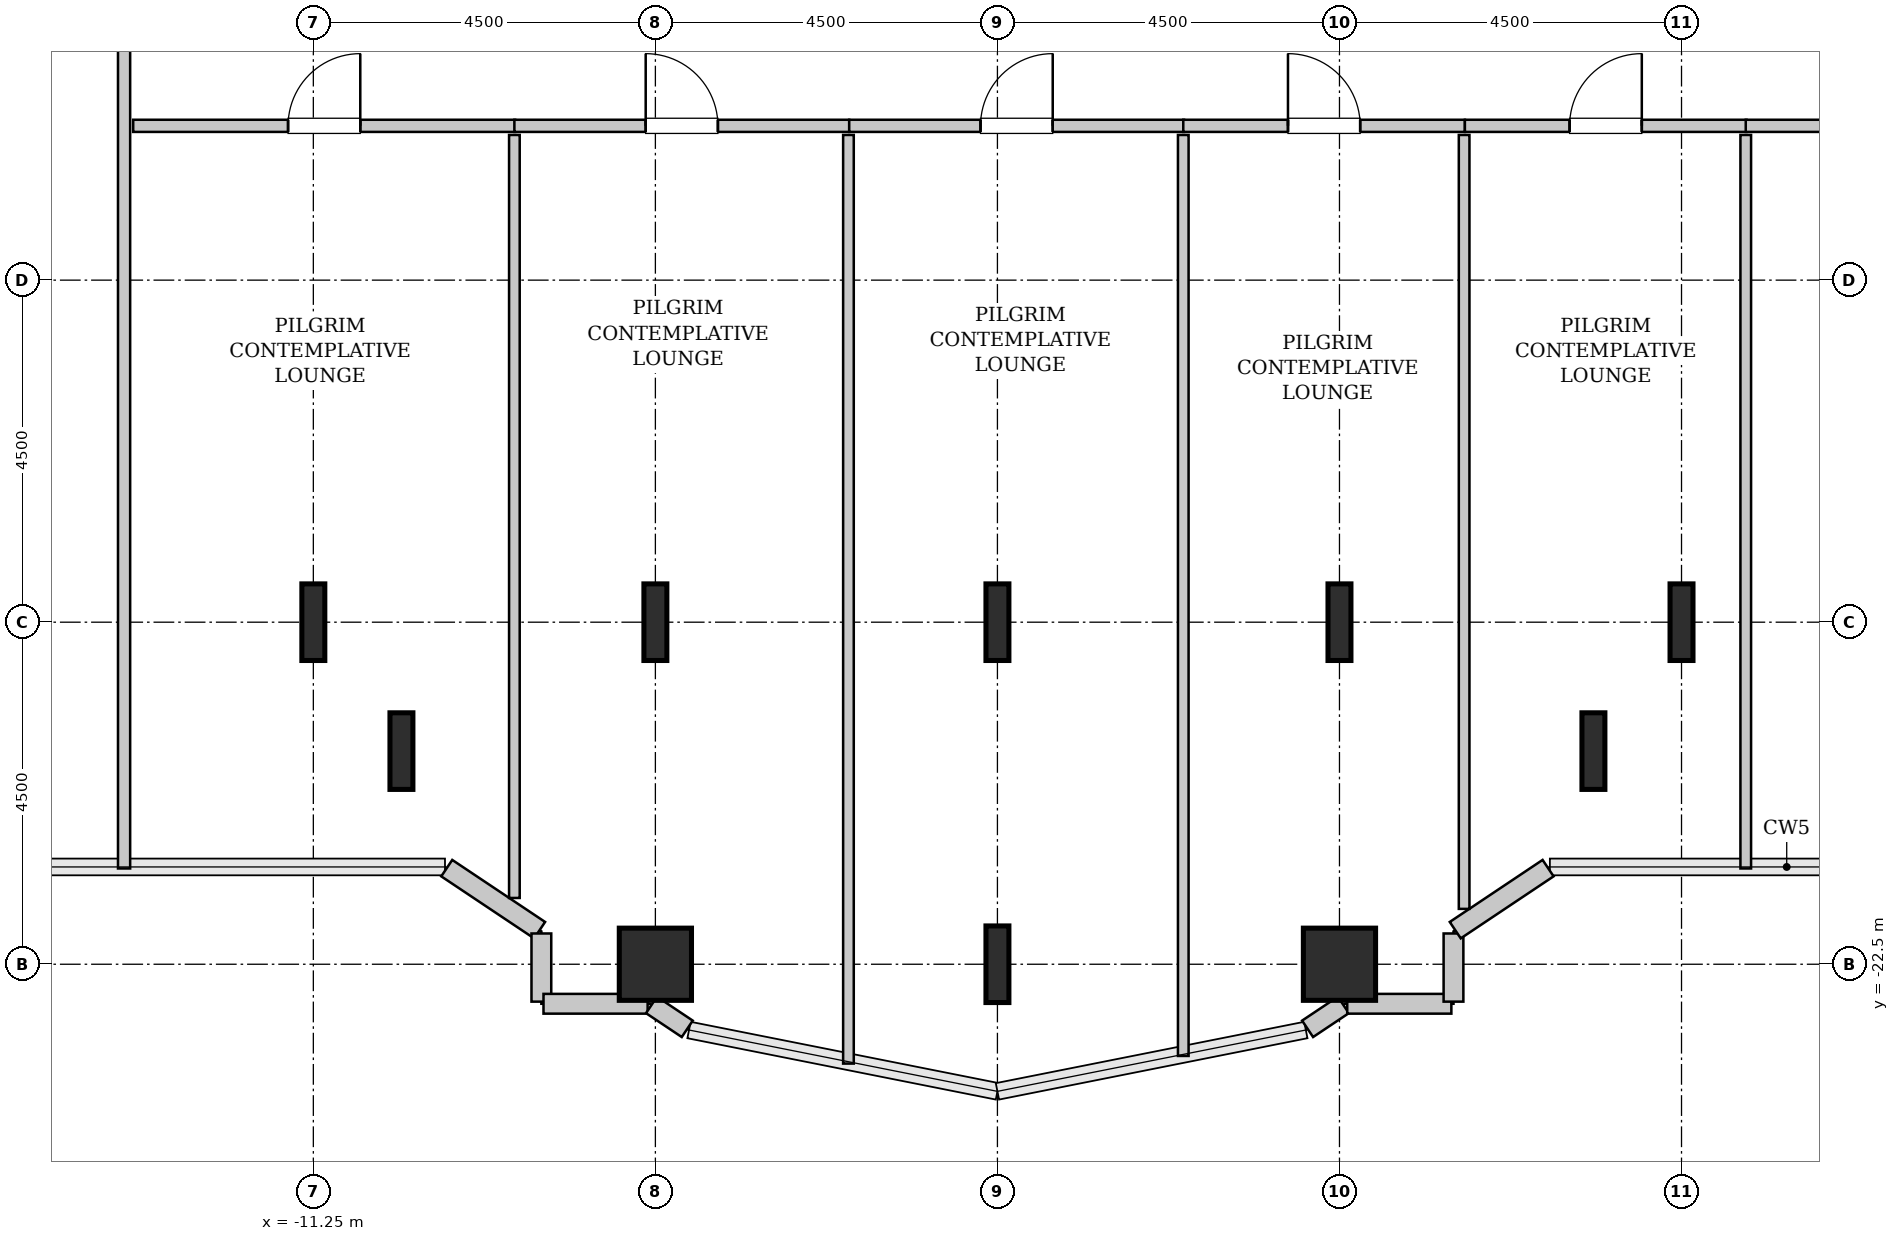
"""IFC4 building model, lengths in metres.
Left out: names, types, materials, properties, quantities, classifications, styles, units other than length and angle.
Written with IfcOpenShell. Run it as: python <this file> out.ifc"""

import sys

from ifc_helpers import new_model, si_unit, direction, frame, frame_2d, origin, origin_2d, place, context, subcontext, project, spatial, rectangle, hollow_rectangle, i_section, extrude, source, transform, mapped, element, fill, save


model = new_model("IFC4")
c1 = context("Model", 3, precision=1e-05, world=origin(), true_north=direction((0.0, 1.0)))
c2 = subcontext(c1, "Body", "Model", "MODEL_VIEW")
j1 = project(units=[si_unit("LENGTHUNIT", "METRE"), si_unit("PLANEANGLEUNIT", "RADIAN")], contexts=[c1])
p1 = place(None, origin())
s1 = spatial("IfcSite", under=j1, at=p1, CompositionType="ELEMENT")
p2 = place(p1, origin())
s2 = spatial("IfcBuilding", under=s1, at=p2, CompositionType="ELEMENT")
p3 = place(p2, frame((0.0, 0.0, 48.2)))
s3 = spatial("IfcBuildingStorey", under=s2, at=p3, CompositionType="ELEMENT", Elevation=48.2)
m1 = source(origin(), c2, "Body", "SweptSolid", [
    extrude(i_section(OverallWidth=0.302, OverallDepth=1.008, WebThickness=0.021, FlangeThickness=0.04, FilletRadius=0.03, at=origin_2d()), origin(), (0.0, 0.0, 1.0), 3.8),
])
for number, where, z_axis, x_axis in (
    (1, (-11.25, -18.0, 0.0), (0.0, 0.0, 1.0), (1.0, 0.0, 0.0)),
    (2, (-10.091, -19.696, 0.0), (0.0, 0.0, 1.0), (1.0, 0.0, 0.0)),
):
    element("IfcColumn", number, at=place(p3, frame(where, z_axis=z_axis, x_axis=x_axis)), inside=s3, PredefinedType="COLUMN", context=c2, shape_type="MappedRepresentation", body=[
        mapped(m1, transform((0.0, 0.0, 0.0), x_axis=(1.0, 0.0, 0.0), y_axis=(0.0, 1.0, 0.0), z_axis=(0.0, 0.0, 1.0), scale=1.0)),
    ])
m2 = source(origin(), c2, "Body", "SweptSolid", [
    extrude(hollow_rectangle(XDim=0.95, YDim=0.95, WallThickness=0.045, InnerFilletRadius=0.045, OuterFilletRadius=0.09, at=origin_2d()), origin(), (0.0, 0.0, 1.0), 3.8),
])
p4 = place(p3, frame((-6.75, -22.5, 0.0), z_axis=(0.0, 0.0, 1.0), x_axis=(1.0, 0.0, 0.0)))
e3 = element("IfcColumn", 3, at=p4, inside=s3, PredefinedType="COLUMN", context=c2, shape_type="MappedRepresentation", body=[
    mapped(m2, transform((0.0, 0.0, 0.0), x_axis=(1.0, 0.0, 0.0), y_axis=(0.0, 1.0, 0.0), z_axis=(0.0, 0.0, 1.0), scale=1.0)),
])
for number, where, z_axis, x_axis in (
    (4, (-6.75, -18.0, 0.0), (0.0, 0.0, 1.0), (1.0, 0.0, 0.0)),
    (5, (-2.25, -22.5, 0.0), (0.0, 0.0, 1.0), (1.0, 0.0, 0.0)),
    (6, (-2.25, -18.0, 0.0), (0.0, 0.0, 1.0), (1.0, 0.0, 0.0)),
):
    element("IfcColumn", number, at=place(p3, frame(where, z_axis=z_axis, x_axis=x_axis)), inside=s3, PredefinedType="COLUMN", context=c2, shape_type="MappedRepresentation", body=[
        mapped(m1, transform((0.0, 0.0, 0.0), x_axis=(1.0, 0.0, 0.0), y_axis=(0.0, 1.0, 0.0), z_axis=(0.0, 0.0, 1.0), scale=1.0)),
    ])
p5 = place(p3, frame((2.25, -22.5, 0.0), z_axis=(0.0, 0.0, 1.0), x_axis=(1.0, 0.0, 0.0)))
e7 = element("IfcColumn", 7, at=p5, inside=s3, PredefinedType="COLUMN", context=c2, shape_type="MappedRepresentation", body=[
    mapped(m2, transform((0.0, 0.0, 0.0), x_axis=(1.0, 0.0, 0.0), y_axis=(0.0, 1.0, 0.0), z_axis=(0.0, 0.0, 1.0), scale=1.0)),
])
for number, where, z_axis, x_axis in (
    (8, (2.25, -18.0, 0.0), (0.0, 0.0, 1.0), (1.0, 0.0, 0.0)),
    (9, (5.591, -19.696, 0.0), (0.0, 0.0, 1.0), (1.0, 0.0, 0.0)),
    (10, (6.75, -18.0, 0.0), (0.0, 0.0, 1.0), (1.0, 0.0, 0.0)),
):
    element("IfcColumn", number, at=place(p3, frame(where, z_axis=z_axis, x_axis=x_axis)), inside=s3, PredefinedType="COLUMN", context=c2, shape_type="MappedRepresentation", body=[
        mapped(m1, transform((0.0, 0.0, 0.0), x_axis=(1.0, 0.0, 0.0), y_axis=(0.0, 1.0, 0.0), z_axis=(0.0, 0.0, 1.0), scale=1.0)),
    ])
m3 = source(origin(), c2, "Body", "SweptSolid", [
    extrude(rectangle(XDim=1.469, YDim=0.26, at=frame_2d((0.734, 0.0))), origin(), (0.0, 0.0, 1.0), 3.55),
])
p6 = place(p3, frame((-9.495, -21.236, 0.0), z_axis=(0.0, 0.0, 1.0), x_axis=(0.831461760506, -0.555581983884, 0.0)))
e11 = element("IfcWall", 11, at=p6, inside=s3, PredefinedType="SOLIDWALL", context=c2, shape_type="MappedRepresentation", body=[
    mapped(m3, transform((0.0, 0.0, 0.0), x_axis=(1.0, 0.0, 0.0), y_axis=(0.0, 1.0, 0.0), z_axis=(0.0, 0.0, 1.0), scale=1.0)),
])
m4 = source(origin(), c2, "Body", "SweptSolid", [
    extrude(rectangle(XDim=0.897, YDim=0.26, at=frame_2d((0.448, 0.0))), origin(), (0.0, 0.0, 1.0), 3.55),
])
p7 = place(p3, frame((-8.25, -22.095, 0.0), z_axis=(0.0, 0.0, 1.0), x_axis=(0.0, -1.0, 0.0)))
e12 = element("IfcWall", 12, at=p7, inside=s3, PredefinedType="SOLIDWALL", context=c2, shape_type="MappedRepresentation", body=[
    mapped(m4, transform((0.0, 0.0, 0.0), x_axis=(1.0, 0.0, 0.0), y_axis=(0.0, 1.0, 0.0), z_axis=(0.0, 0.0, 1.0), scale=1.0)),
])
m5 = source(origin(), c2, "Body", "SweptSolid", [
    extrude(rectangle(XDim=1.37, YDim=0.26, at=frame_2d((0.685, 0.0))), origin(), (0.0, 0.0, 1.0), 3.55),
])
p8 = place(p3, frame((-8.222, -23.02, 0.0), z_axis=(0.0, 0.0, 1.0), x_axis=(1.0, 0.0, 0.0)))
e13 = element("IfcWall", 13, at=p8, inside=s3, PredefinedType="SOLIDWALL", context=c2, shape_type="MappedRepresentation", body=[
    mapped(m5, transform((0.0, 0.0, 0.0), x_axis=(1.0, 0.0, 0.0), y_axis=(0.0, 1.0, 0.0), z_axis=(0.0, 0.0, 1.0), scale=1.0)),
])
m6 = source(origin(), c2, "Body", "SweptSolid", [
    extrude(rectangle(XDim=0.565, YDim=0.26, at=frame_2d((0.283, 0.0))), origin(), (0.0, 0.0, 1.0), 3.55),
])
for number, where, z_axis, x_axis in (
    (14, (-6.801, -23.036, 0.0), (0.0, 0.0, 1.0), (0.832, -0.555, 0.0)),
    (15, (1.831, -23.35, 0.0), (0.0, 0.0, 1.0), (0.832, 0.555, 0.0)),
):
    element("IfcWall", number, at=place(p3, frame(where, z_axis=z_axis, x_axis=x_axis)), inside=s3, PredefinedType="SOLIDWALL", context=c2, shape_type="MappedRepresentation", body=[
        mapped(m6, transform((0.0, 0.0, 0.0), x_axis=(1.0, 0.0, 0.0), y_axis=(0.0, 1.0, 0.0), z_axis=(0.0, 0.0, 1.0), scale=1.0)),
    ])
p9 = place(p3, frame((2.352, -23.02, 0.0), z_axis=(0.0, 0.0, 1.0), x_axis=(1.0, 0.0, 0.0)))
e16 = element("IfcWall", 16, at=p9, inside=s3, PredefinedType="SOLIDWALL", context=c2, shape_type="MappedRepresentation", body=[
    mapped(m5, transform((0.0, 0.0, 0.0), x_axis=(1.0, 0.0, 0.0), y_axis=(0.0, 1.0, 0.0), z_axis=(0.0, 0.0, 1.0), scale=1.0)),
])
p10 = place(p3, frame((3.75, -22.992, 0.0), z_axis=(0.0, 0.0, 1.0), x_axis=(0.0, 1.0, 0.0)))
e17 = element("IfcWall", 17, at=p10, inside=s3, PredefinedType="SOLIDWALL", context=c2, shape_type="MappedRepresentation", body=[
    mapped(m4, transform((0.0, 0.0, 0.0), x_axis=(1.0, 0.0, 0.0), y_axis=(0.0, 1.0, 0.0), z_axis=(0.0, 0.0, 1.0), scale=1.0)),
])
p11 = place(p3, frame((3.773, -22.052, 0.0), z_axis=(0.0, 0.0, 1.0), x_axis=(0.831461760506, 0.555581983884, 0.0)))
e18 = element("IfcWall", 18, at=p11, inside=s3, PredefinedType="SOLIDWALL", context=c2, shape_type="MappedRepresentation", body=[
    mapped(m3, transform((0.0, 0.0, 0.0), x_axis=(1.0, 0.0, 0.0), y_axis=(0.0, 1.0, 0.0), z_axis=(0.0, 0.0, 1.0), scale=1.0)),
])
m7 = source(origin(), c2, "Body", "SweptSolid", [
    extrude(rectangle(XDim=12.745, YDim=0.16, at=frame_2d((6.373, 0.0))), origin(), (0.0, 0.0, 1.0), 3.535),
])
p12 = place(p3, frame((-13.74, -21.24, 0.0), z_axis=(0.0, 0.0, 1.0), x_axis=(0.0, 1.0, 0.0)))
e19 = element("IfcWall", 19, at=p12, inside=s3, PredefinedType="PARTITIONING", context=c2, shape_type="MappedRepresentation", body=[
    mapped(m7, transform((0.0, 0.0, 0.0), x_axis=(1.0, 0.0, 0.0), y_axis=(0.0, 1.0, 0.0), z_axis=(0.0, 0.0, 1.0), scale=1.0)),
])
p13 = place(p12, frame((10.762, 0.0, 0.0)))
e20 = element("IfcOpeningElement", 20, at=p13, cuts=e19, PredefinedType="OPENING", context=c2, shape_type="SweptSolid", body=[
    extrude(rectangle(XDim=0.95, YDim=2.1, at=frame_2d((0.475, 1.05))), frame((0.0, 0.09, 0.0), z_axis=(0.0, -1.0, 0.0), x_axis=(1.0, 0.0, 0.0)), (0.0, 0.0, 1.0), 0.18),
])
m8 = source(origin(), c2, "Body", "SweptSolid", [
    extrude(rectangle(XDim=5.025, YDim=0.16, at=frame_2d((2.513, 0.0))), origin(), (0.0, 0.0, 1.0), 3.535),
])
p14 = place(p3, frame((-13.62, -11.47, 0.0), z_axis=(0.0, 0.0, 1.0), x_axis=(1.0, 0.0, 0.0)))
e21 = element("IfcWall", 21, at=p14, inside=s3, PredefinedType="PARTITIONING", context=c2, shape_type="MappedRepresentation", body=[
    mapped(m8, transform((0.0, 0.0, 0.0), x_axis=(1.0, 0.0, 0.0), y_axis=(0.0, 1.0, 0.0), z_axis=(0.0, 0.0, 1.0), scale=1.0)),
])
p15 = place(p14, frame((2.038, 0.0, 0.0)))
e22 = element("IfcOpeningElement", 22, at=p15, cuts=e21, PredefinedType="OPENING", context=c2, shape_type="SweptSolid", body=[
    extrude(rectangle(XDim=0.95, YDim=2.1, at=frame_2d((0.475, 1.05))), frame((0.0, 0.09, 0.0), z_axis=(0.0, -1.0, 0.0), x_axis=(1.0, 0.0, 0.0)), (0.0, 0.0, 1.0), 0.18),
])
m9 = source(origin(), c2, "Body", "SweptSolid", [
    extrude(rectangle(XDim=10.038, YDim=0.14, at=frame_2d((5.019, 0.0))), origin(), (0.0, 0.0, 1.0), 3.535),
])
p16 = place(p3, frame((-8.605, -21.628, 0.0), z_axis=(0.0, 0.0, 1.0), x_axis=(0.0, 1.0, 0.0)))
e23 = element("IfcWall", 23, at=p16, inside=s3, PredefinedType="PARTITIONING", context=c2, shape_type="MappedRepresentation", body=[
    mapped(m9, transform((0.0, 0.0, 0.0), x_axis=(1.0, 0.0, 0.0), y_axis=(0.0, 1.0, 0.0), z_axis=(0.0, 0.0, 1.0), scale=1.0)),
])
m10 = source(origin(), c2, "Body", "SweptSolid", [
    extrude(rectangle(XDim=4.405, YDim=0.16, at=frame_2d((2.203, 0.0))), origin(), (0.0, 0.0, 1.0), 3.535),
])
p17 = place(p3, frame((-8.605, -11.47, 0.0), z_axis=(0.0, 0.0, 1.0), x_axis=(1.0, 0.0, 0.0)))
e24 = element("IfcWall", 24, at=p17, inside=s3, PredefinedType="PARTITIONING", context=c2, shape_type="MappedRepresentation", body=[
    mapped(m10, transform((0.0, 0.0, 0.0), x_axis=(1.0, 0.0, 0.0), y_axis=(0.0, 1.0, 0.0), z_axis=(0.0, 0.0, 1.0), scale=1.0)),
])
p18 = place(p17, frame((1.728, 0.0, 0.0)))
e25 = element("IfcOpeningElement", 25, at=p18, cuts=e24, PredefinedType="OPENING", context=c2, shape_type="SweptSolid", body=[
    extrude(rectangle(XDim=0.95, YDim=2.1, at=frame_2d((0.475, 1.05))), frame((0.0, 0.09, 0.0), z_axis=(0.0, -1.0, 0.0), x_axis=(1.0, 0.0, 0.0)), (0.0, 0.0, 1.0), 0.18),
])
m11 = source(origin(), c2, "Body", "SweptSolid", [
    extrude(rectangle(XDim=12.217, YDim=0.14, at=frame_2d((6.108, 0.0))), origin(), (0.0, 0.0, 1.0), 3.535),
])
p19 = place(p3, frame((-4.21, -23.807, 0.0), z_axis=(0.0, 0.0, 1.0), x_axis=(0.0, 1.0, 0.0)))
e26 = element("IfcWall", 26, at=p19, inside=s3, PredefinedType="PARTITIONING", context=c2, shape_type="MappedRepresentation", body=[
    mapped(m11, transform((0.0, 0.0, 0.0), x_axis=(1.0, 0.0, 0.0), y_axis=(0.0, 1.0, 0.0), z_axis=(0.0, 0.0, 1.0), scale=1.0)),
])
p20 = place(p3, frame((-4.2, -11.47, 0.0), z_axis=(0.0, 0.0, 1.0), x_axis=(1.0, 0.0, 0.0)))
e27 = element("IfcWall", 27, at=p20, inside=s3, PredefinedType="PARTITIONING", context=c2, shape_type="MappedRepresentation", body=[
    mapped(m10, transform((0.0, 0.0, 0.0), x_axis=(1.0, 0.0, 0.0), y_axis=(0.0, 1.0, 0.0), z_axis=(0.0, 0.0, 1.0), scale=1.0)),
])
p21 = place(p20, frame((1.728, 0.0, 0.0)))
e28 = element("IfcOpeningElement", 28, at=p21, cuts=e27, PredefinedType="OPENING", context=c2, shape_type="SweptSolid", body=[
    extrude(rectangle(XDim=0.95, YDim=2.1, at=frame_2d((0.475, 1.05))), frame((0.0, 0.09, 0.0), z_axis=(0.0, -1.0, 0.0), x_axis=(1.0, 0.0, 0.0)), (0.0, 0.0, 1.0), 0.18),
])
m12 = source(origin(), c2, "Body", "SweptSolid", [
    extrude(rectangle(XDim=12.116, YDim=0.14, at=frame_2d((6.058, 0.0))), origin(), (0.0, 0.0, 1.0), 3.535),
])
p22 = place(p3, frame((0.195, -23.706, 0.0), z_axis=(0.0, 0.0, 1.0), x_axis=(0.0, 1.0, 0.0)))
e29 = element("IfcWall", 29, at=p22, inside=s3, PredefinedType="PARTITIONING", context=c2, shape_type="MappedRepresentation", body=[
    mapped(m12, transform((0.0, 0.0, 0.0), x_axis=(1.0, 0.0, 0.0), y_axis=(0.0, 1.0, 0.0), z_axis=(0.0, 0.0, 1.0), scale=1.0)),
])
m13 = source(origin(), c2, "Body", "SweptSolid", [
    extrude(rectangle(XDim=3.705, YDim=0.16, at=frame_2d((1.853, 0.0))), origin(), (0.0, 0.0, 1.0), 3.535),
])
p23 = place(p3, frame((0.195, -11.47, 0.0), z_axis=(0.0, 0.0, 1.0), x_axis=(1.0, 0.0, 0.0)))
e30 = element("IfcWall", 30, at=p23, inside=s3, PredefinedType="PARTITIONING", context=c2, shape_type="MappedRepresentation", body=[
    mapped(m13, transform((0.0, 0.0, 0.0), x_axis=(1.0, 0.0, 0.0), y_axis=(0.0, 1.0, 0.0), z_axis=(0.0, 0.0, 1.0), scale=1.0)),
])
p24 = place(p23, frame((1.377, 0.0, 0.0)))
e31 = element("IfcOpeningElement", 31, at=p24, cuts=e30, PredefinedType="OPENING", context=c2, shape_type="SweptSolid", body=[
    extrude(rectangle(XDim=0.95, YDim=2.1, at=frame_2d((0.475, 1.05))), frame((0.0, 0.09, 0.0), z_axis=(0.0, -1.0, 0.0), x_axis=(1.0, 0.0, 0.0)), (0.0, 0.0, 1.0), 0.18),
])
m14 = source(origin(), c2, "Body", "SweptSolid", [
    extrude(rectangle(XDim=10.182, YDim=0.14, at=frame_2d((5.091, 0.0))), origin(), (0.0, 0.0, 1.0), 3.535),
])
p25 = place(p3, frame((3.89, -21.772, 0.0), z_axis=(0.0, 0.0, 1.0), x_axis=(0.0, 1.0, 0.0)))
e32 = element("IfcWall", 32, at=p25, inside=s3, PredefinedType="PARTITIONING", context=c2, shape_type="MappedRepresentation", body=[
    mapped(m14, transform((0.0, 0.0, 0.0), x_axis=(1.0, 0.0, 0.0), y_axis=(0.0, 1.0, 0.0), z_axis=(0.0, 0.0, 1.0), scale=1.0)),
])
m15 = source(origin(), c2, "Body", "SweptSolid", [
    extrude(rectangle(XDim=3.705, YDim=0.16, at=frame_2d((1.853, 0.0))), origin(), (0.0, 0.0, 1.0), 3.535),
])
p26 = place(p3, frame((3.9, -11.47, 0.0), z_axis=(0.0, 0.0, 1.0), x_axis=(1.0, 0.0, 0.0)))
e33 = element("IfcWall", 33, at=p26, inside=s3, PredefinedType="PARTITIONING", context=c2, shape_type="MappedRepresentation", body=[
    mapped(m15, transform((0.0, 0.0, 0.0), x_axis=(1.0, 0.0, 0.0), y_axis=(0.0, 1.0, 0.0), z_axis=(0.0, 0.0, 1.0), scale=1.0)),
])
p27 = place(p26, frame((1.377, 0.0, 0.0)))
e34 = element("IfcOpeningElement", 34, at=p27, cuts=e33, PredefinedType="OPENING", context=c2, shape_type="SweptSolid", body=[
    extrude(rectangle(XDim=0.95, YDim=2.1, at=frame_2d((0.475, 1.05))), frame((0.0, 0.09, 0.0), z_axis=(0.0, -1.0, 0.0), x_axis=(1.0, 0.0, 0.0)), (0.0, 0.0, 1.0), 0.18),
])
m16 = source(origin(), c2, "Body", "SweptSolid", [
    extrude(rectangle(XDim=9.65, YDim=0.14, at=frame_2d((4.825, 0.0))), origin(), (0.0, 0.0, 1.0), 3.535),
])
p28 = place(p3, frame((7.595, -21.24, 0.0), z_axis=(0.0, 0.0, 1.0), x_axis=(0.0, 1.0, 0.0)))
e35 = element("IfcWall", 35, at=p28, inside=s3, PredefinedType="PARTITIONING", context=c2, shape_type="MappedRepresentation", body=[
    mapped(m16, transform((0.0, 0.0, 0.0), x_axis=(1.0, 0.0, 0.0), y_axis=(0.0, 1.0, 0.0), z_axis=(0.0, 0.0, 1.0), scale=1.0)),
])
m17 = source(origin(), c2, "Body", "SweptSolid", [
    extrude(rectangle(XDim=6.025, YDim=0.16, at=frame_2d((3.013, 0.0))), origin(), (0.0, 0.0, 1.0), 3.535),
])
p29 = place(p3, frame((7.595, -11.47, 0.0), z_axis=(0.0, 0.0, 1.0), x_axis=(1.0, 0.0, 0.0)))
e36 = element("IfcWall", 36, at=p29, inside=s3, PredefinedType="PARTITIONING", context=c2, shape_type="MappedRepresentation", body=[
    mapped(m17, transform((0.0, 0.0, 0.0), x_axis=(1.0, 0.0, 0.0), y_axis=(0.0, 1.0, 0.0), z_axis=(0.0, 0.0, 1.0), scale=1.0)),
])
p30 = place(p29, frame((2.538, 0.0, 0.0)))
e37 = element("IfcOpeningElement", 37, at=p30, cuts=e36, PredefinedType="OPENING", context=c2, shape_type="SweptSolid", body=[
    extrude(rectangle(XDim=0.95, YDim=2.1, at=frame_2d((0.475, 1.05))), frame((0.0, 0.09, 0.0), z_axis=(0.0, -1.0, 0.0), x_axis=(1.0, 0.0, 0.0)), (0.0, 0.0, 1.0), 0.18),
])
m18 = source(origin(), c2, "Body", "SweptSolid", [
    extrude(rectangle(XDim=0.95, YDim=2.1, at=frame_2d((0.475, 1.05))), frame((0.0, 0.025, 0.0), z_axis=(0.0, -1.0, 0.0), x_axis=(1.0, 0.0, 0.0)), (0.0, 0.0, 1.0), 0.05),
])
p31 = place(p15, origin())
e38 = element("IfcDoor", 38, at=p31, inside=s3, OperationType="SINGLE_SWING_RIGHT", PredefinedType="DOOR", context=c2, shape_type="MappedRepresentation", body=[
    mapped(m18, transform((0.0, 0.0, 0.0), x_axis=(1.0, 0.0, 0.0), y_axis=(0.0, 1.0, 0.0), z_axis=(0.0, 0.0, 1.0), scale=1.0)),
])
fill(e22, e38)
p32 = place(p18, origin())
e39 = element("IfcDoor", 39, at=p32, inside=s3, OperationType="SINGLE_SWING_LEFT", PredefinedType="DOOR", context=c2, shape_type="MappedRepresentation", body=[
    mapped(m18, transform((0.0, 0.0, 0.0), x_axis=(1.0, 0.0, 0.0), y_axis=(0.0, 1.0, 0.0), z_axis=(0.0, 0.0, 1.0), scale=1.0)),
])
fill(e25, e39)
p33 = place(p21, origin())
e40 = element("IfcDoor", 40, at=p33, inside=s3, OperationType="SINGLE_SWING_RIGHT", PredefinedType="DOOR", context=c2, shape_type="MappedRepresentation", body=[
    mapped(m18, transform((0.0, 0.0, 0.0), x_axis=(1.0, 0.0, 0.0), y_axis=(0.0, 1.0, 0.0), z_axis=(0.0, 0.0, 1.0), scale=1.0)),
])
fill(e28, e40)
p34 = place(p24, origin())
e41 = element("IfcDoor", 41, at=p34, inside=s3, OperationType="SINGLE_SWING_LEFT", PredefinedType="DOOR", context=c2, shape_type="MappedRepresentation", body=[
    mapped(m18, transform((0.0, 0.0, 0.0), x_axis=(1.0, 0.0, 0.0), y_axis=(0.0, 1.0, 0.0), z_axis=(0.0, 0.0, 1.0), scale=1.0)),
])
fill(e31, e41)
p35 = place(p27, origin())
e42 = element("IfcDoor", 42, at=p35, inside=s3, OperationType="SINGLE_SWING_RIGHT", PredefinedType="DOOR", context=c2, shape_type="MappedRepresentation", body=[
    mapped(m18, transform((0.0, 0.0, 0.0), x_axis=(1.0, 0.0, 0.0), y_axis=(0.0, 1.0, 0.0), z_axis=(0.0, 0.0, 1.0), scale=1.0)),
])
fill(e34, e42)
save(model, sys.argv[1])
